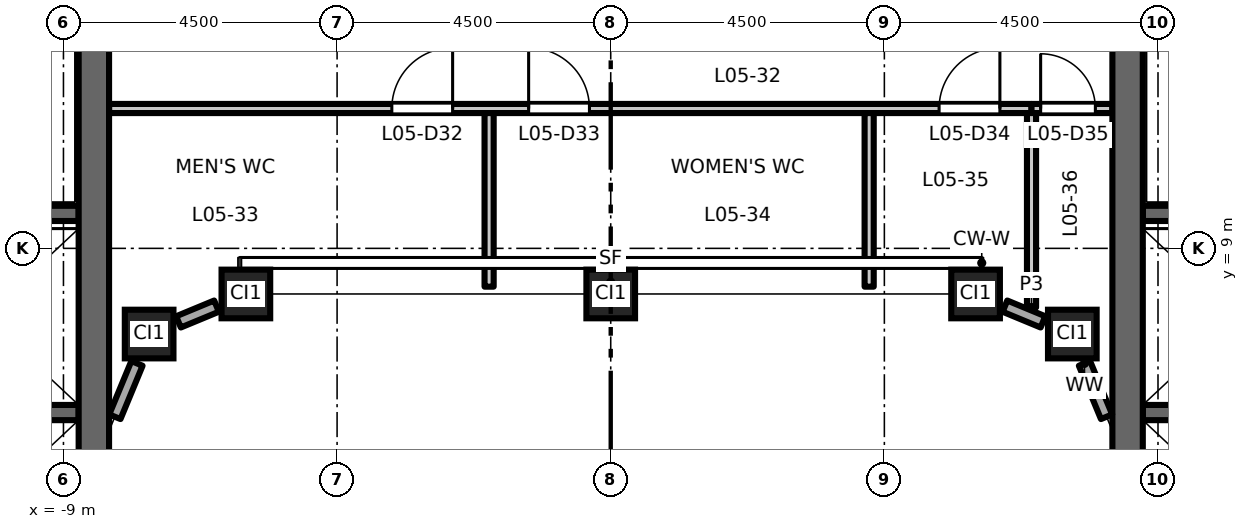
"""IFC4 building model, lengths in metres.
Left out: names, types, materials, properties, quantities, classifications, styles, units other than length and angle.
Written with IfcOpenShell. Run it as: python <this file> out.ifc"""

import sys

from ifc_helpers import new_model, si_unit, direction, frame, frame_2d, origin, origin_2d, place, context, subcontext, project, spatial, rectangle, hollow_rectangle, extrude, element, fill, save


model = new_model("IFC4")
c1 = context("Model", 3, precision=1e-05, world=origin(), true_north=direction((0.0, 1.0)))
c2 = subcontext(c1, "Body", "Model", "MODEL_VIEW")
j1 = project(units=[si_unit("LENGTHUNIT", "METRE"), si_unit("PLANEANGLEUNIT", "RADIAN")], contexts=[c1])
p1 = place(None, origin())
s1 = spatial("IfcSite", under=j1, at=p1, CompositionType="ELEMENT")
p2 = place(p1, origin())
s2 = spatial("IfcBuilding", under=s1, at=p2, CompositionType="ELEMENT")
p3 = place(p2, frame((0.0, 0.0, 26.7)))
s3 = spatial("IfcBuildingStorey", under=s2, at=p3, CompositionType="ELEMENT", Elevation=26.7)
for number, where, z_axis, x_axis in (
    (1, (-7.591, 7.591, 0.0), (0.0, 0.0, 1.0), (1.0, 0.0, 0.0)),
    (2, (-6.0, 8.25, 0.0), (0.0, 0.0, 1.0), (1.0, 0.0, 0.0)),
    (3, (0.0, 8.25, 0.0), (0.0, 0.0, 1.0), (1.0, 0.0, 0.0)),
    (4, (6.0, 8.25, 0.0), (0.0, 0.0, 1.0), (1.0, 0.0, 0.0)),
    (5, (7.591, 7.591, 0.0), (0.0, 0.0, 1.0), (1.0, 0.0, 0.0)),
):
    element("IfcColumn", number, at=place(p3, frame(where, z_axis=z_axis, x_axis=x_axis)), inside=s3, PredefinedType="COLUMN", context=c2, shape_type="SweptSolid", body=[
        extrude(hollow_rectangle(XDim=0.8, YDim=0.8, WallThickness=0.05, at=origin_2d()), origin(), (0.0, 0.0, 1.0), 4.5),
    ])
p4 = place(p3, frame((-8.75, 6.3, 0.0), z_axis=(0.0, 0.0, 1.0), x_axis=(-1.0, 0.0, 0.0)))
e6 = element("IfcWall", 6, at=p4, inside=s3, PredefinedType="SHEAR", context=c2, shape_type="SweptSolid", body=[
    extrude(rectangle(XDim=3.1, YDim=0.25, at=frame_2d((1.55, 0.0))), origin(), (0.0, 0.0, 1.0), 4.35),
])
p5 = place(p3, frame((-8.75, 9.575, 0.0), z_axis=(0.0, 0.0, 1.0), x_axis=(-1.0, 0.0, 0.0)))
e7 = element("IfcWall", 7, at=p5, inside=s3, PredefinedType="SHEAR", context=c2, shape_type="SweptSolid", body=[
    extrude(rectangle(XDim=8.0, YDim=0.25, at=frame_2d((4.0, 0.0))), origin(), (0.0, 0.0, 1.0), 4.35),
])
p6 = place(p5, frame((6.65, 0.0, 0.0)))
e8 = element("IfcOpeningElement", 8, at=p6, cuts=e7, PredefinedType="OPENING", context=c2, shape_type="SweptSolid", body=[
    extrude(rectangle(XDim=1.1, YDim=2.1, at=frame_2d((0.55, 1.05))), frame((0.0, 0.135, 0.0), z_axis=(0.0, -1.0, 0.0), x_axis=(1.0, 0.0, 0.0)), (0.0, 0.0, 1.0), 0.27),
])
p7 = place(p3, frame((-8.5, -13.0, 0.0), z_axis=(0.0, 0.0, 1.0), x_axis=(0.0, 1.0, 0.0)))
e9 = element("IfcWall", 9, at=p7, inside=s3, PredefinedType="SHEAR", context=c2, shape_type="SweptSolid", body=[
    extrude(rectangle(XDim=26.0, YDim=0.5, at=frame_2d((13.0, 0.0))), origin(), (0.0, 0.0, 1.0), 4.35),
])
p8 = place(p3, frame((8.75, 6.3, 0.0), z_axis=(0.0, 0.0, 1.0), x_axis=(1.0, 0.0, 0.0)))
e10 = element("IfcWall", 10, at=p8, inside=s3, PredefinedType="SHEAR", context=c2, shape_type="SweptSolid", body=[
    extrude(rectangle(XDim=3.1, YDim=0.25, at=frame_2d((1.55, 0.0))), origin(), (0.0, 0.0, 1.0), 4.35),
])
p9 = place(p3, frame((8.75, 9.575, 0.0), z_axis=(0.0, 0.0, 1.0), x_axis=(1.0, 0.0, 0.0)))
e11 = element("IfcWall", 11, at=p9, inside=s3, PredefinedType="SHEAR", context=c2, shape_type="SweptSolid", body=[
    extrude(rectangle(XDim=8.0, YDim=0.25, at=frame_2d((4.0, 0.0))), origin(), (0.0, 0.0, 1.0), 4.35),
])
p10 = place(p9, frame((6.65, 0.0, 0.0)))
e12 = element("IfcOpeningElement", 12, at=p10, cuts=e11, PredefinedType="OPENING", context=c2, shape_type="SweptSolid", body=[
    extrude(rectangle(XDim=1.1, YDim=2.1, at=frame_2d((0.55, 1.05))), frame((0.0, 0.135, 0.0), z_axis=(0.0, -1.0, 0.0), x_axis=(1.0, 0.0, 0.0)), (0.0, 0.0, 1.0), 0.27),
])
p11 = place(p3, frame((8.5, -13.0, 0.0), z_axis=(0.0, 0.0, 1.0), x_axis=(0.0, 1.0, 0.0)))
e13 = element("IfcWall", 13, at=p11, inside=s3, PredefinedType="SHEAR", context=c2, shape_type="SweptSolid", body=[
    extrude(rectangle(XDim=26.0, YDim=0.5, at=frame_2d((13.0, 0.0))), origin(), (0.0, 0.0, 1.0), 4.35),
])
p12 = place(p3, frame((8.154, 6.231, 0.0), z_axis=(0.0, 0.0, 1.0), x_axis=(-0.382624318388, 0.923904016107, 0.0)))
e14 = element("IfcWall", 14, at=p12, inside=s3, PredefinedType="STANDARD", context=c2, shape_type="SweptSolid", body=[
    extrude(rectangle(XDim=0.949, YDim=0.2, at=frame_2d((0.475, 0.0))), origin(), (0.0, 0.0, 1.0), 3.73),
])
for number, where, z_axis, x_axis in (
    (15, (7.108, 7.791, 0.0), (0.0, 0.0, 1.0), (-0.924, 0.383, 0.0)),
    (16, (-6.483, 8.05, 0.0), (0.0, 0.0, 1.0), (-0.924, -0.383, 0.0)),
):
    element("IfcWall", number, at=place(p3, frame(where, z_axis=z_axis, x_axis=x_axis)), inside=s3, PredefinedType="STANDARD", context=c2, shape_type="SweptSolid", body=[
        extrude(rectangle(XDim=0.677, YDim=0.2, at=frame_2d((0.338, 0.0))), origin(), (0.0, 0.0, 1.0), 3.73),
    ])
p13 = place(p3, frame((-7.791, 7.108, 0.0), z_axis=(0.0, 0.0, 1.0), x_axis=(-0.382624318388, -0.923904016107, 0.0)))
e17 = element("IfcWall", 17, at=p13, inside=s3, PredefinedType="STANDARD", context=c2, shape_type="SweptSolid", body=[
    extrude(rectangle(XDim=0.949, YDim=0.2, at=frame_2d((0.475, 0.0))), origin(), (0.0, 0.0, 1.0), 3.73),
])
p14 = place(p3, frame((-8.25, 11.3, 0.0), z_axis=(0.0, 0.0, 1.0), x_axis=(1.0, 0.0, 0.0)))
e18 = element("IfcWall", 18, at=p14, inside=s3, PredefinedType="PARTITIONING", context=c2, shape_type="SweptSolid", body=[
    extrude(rectangle(XDim=15.17, YDim=0.15, at=frame_2d((7.585, 0.0))), origin(), (0.0, 0.0, 1.0), 4.35),
])
p15 = place(p14, frame((4.65, 0.0, 0.0)))
e19 = element("IfcOpeningElement", 19, at=p15, cuts=e18, PredefinedType="OPENING", context=c2, shape_type="SweptSolid", body=[
    extrude(rectangle(XDim=1.0, YDim=2.1, at=frame_2d((0.5, 1.05))), frame((0.0, 0.085, 0.0), z_axis=(0.0, -1.0, 0.0), x_axis=(1.0, 0.0, 0.0)), (0.0, 0.0, 1.0), 0.17),
])
p16 = place(p14, frame((6.9, 0.0, 0.0)))
e20 = element("IfcOpeningElement", 20, at=p16, cuts=e18, PredefinedType="OPENING", context=c2, shape_type="SweptSolid", body=[
    extrude(rectangle(XDim=1.0, YDim=2.1, at=frame_2d((0.5, 1.05))), frame((0.0, 0.085, 0.0), z_axis=(0.0, -1.0, 0.0), x_axis=(1.0, 0.0, 0.0)), (0.0, 0.0, 1.0), 0.17),
])
p17 = place(p14, frame((13.65, 0.0, 0.0)))
e21 = element("IfcOpeningElement", 21, at=p17, cuts=e18, PredefinedType="OPENING", context=c2, shape_type="SweptSolid", body=[
    extrude(rectangle(XDim=1.0, YDim=2.1, at=frame_2d((0.5, 1.05))), frame((0.0, 0.085, 0.0), z_axis=(0.0, -1.0, 0.0), x_axis=(1.0, 0.0, 0.0)), (0.0, 0.0, 1.0), 0.17),
])
p18 = place(p3, frame((6.92, 11.3, 0.0), z_axis=(0.0, 0.0, 1.0), x_axis=(1.0, 0.0, 0.0)))
e22 = element("IfcWall", 22, at=p18, inside=s3, PredefinedType="PARTITIONING", context=c2, shape_type="SweptSolid", body=[
    extrude(rectangle(XDim=1.33, YDim=0.15, at=frame_2d((0.665, 0.0))), origin(), (0.0, 0.0, 1.0), 4.35),
])
p19 = place(p18, frame((0.15, 0.0, 0.0)))
e23 = element("IfcOpeningElement", 23, at=p19, cuts=e22, PredefinedType="OPENING", context=c2, shape_type="SweptSolid", body=[
    extrude(rectangle(XDim=0.9, YDim=2.1, at=frame_2d((0.45, 1.05))), frame((0.0, 0.085, 0.0), z_axis=(0.0, -1.0, 0.0), x_axis=(1.0, 0.0, 0.0)), (0.0, 0.0, 1.0), 0.17),
])
for number, where, z_axis, x_axis in (
    (24, (-2.0, 8.37, 0.0), (0.0, 0.0, 1.0), (0.0, 1.0, 0.0)),
    (25, (4.25, 8.37, 0.0), (0.0, 0.0, 1.0), (0.0, 1.0, 0.0)),
):
    element("IfcWall", number, at=place(p3, frame(where, z_axis=z_axis, x_axis=x_axis)), inside=s3, PredefinedType="PARTITIONING", context=c2, shape_type="SweptSolid", body=[
        extrude(rectangle(XDim=2.855, YDim=0.15, at=frame_2d((1.427, 0.0))), origin(), (0.0, 0.0, 1.0), 4.35),
    ])
p20 = place(p3, frame((6.92, 8.028, 0.0), z_axis=(0.0, 0.0, 1.0), x_axis=(0.0, 1.0, 0.0)))
e26 = element("IfcWall", 26, at=p20, inside=s3, PredefinedType="PARTITIONING", context=c2, shape_type="SweptSolid", body=[
    extrude(rectangle(XDim=3.197, YDim=0.15, at=frame_2d((1.599, 0.0))), origin(), (0.0, 0.0, 1.0), 4.35),
])
p21 = place(p15, origin())
e27 = element("IfcDoor", 27, at=p21, inside=s3, OperationType="SINGLE_SWING_RIGHT", PredefinedType="DOOR", context=c2, shape_type="SweptSolid", body=[
    extrude(rectangle(XDim=1.0, YDim=2.1, at=frame_2d((0.5, 1.05))), frame((0.0, 0.025, 0.0), z_axis=(0.0, -1.0, 0.0), x_axis=(1.0, 0.0, 0.0)), (0.0, 0.0, 1.0), 0.05),
])
fill(e19, e27)
p22 = place(p16, origin())
e28 = element("IfcDoor", 28, at=p22, inside=s3, OperationType="SINGLE_SWING_LEFT", PredefinedType="DOOR", context=c2, shape_type="SweptSolid", body=[
    extrude(rectangle(XDim=1.0, YDim=2.1, at=frame_2d((0.5, 1.05))), frame((0.0, 0.025, 0.0), z_axis=(0.0, -1.0, 0.0), x_axis=(1.0, 0.0, 0.0)), (0.0, 0.0, 1.0), 0.05),
])
fill(e20, e28)
p23 = place(p17, origin())
e29 = element("IfcDoor", 29, at=p23, inside=s3, OperationType="SINGLE_SWING_RIGHT", PredefinedType="DOOR", context=c2, shape_type="SweptSolid", body=[
    extrude(rectangle(XDim=1.0, YDim=2.1, at=frame_2d((0.5, 1.05))), frame((0.0, 0.025, 0.0), z_axis=(0.0, -1.0, 0.0), x_axis=(1.0, 0.0, 0.0)), (0.0, 0.0, 1.0), 0.05),
])
fill(e21, e29)
p24 = place(p19, origin())
e30 = element("IfcDoor", 30, at=p24, inside=s3, OperationType="SINGLE_SWING_LEFT", PredefinedType="DOOR", context=c2, shape_type="SweptSolid", body=[
    extrude(rectangle(XDim=0.9, YDim=2.1, at=frame_2d((0.45, 1.05))), frame((0.0, 0.025, 0.0), z_axis=(0.0, -1.0, 0.0), x_axis=(1.0, 0.0, 0.0)), (0.0, 0.0, 1.0), 0.05),
])
fill(e23, e30)
save(model, sys.argv[1])
